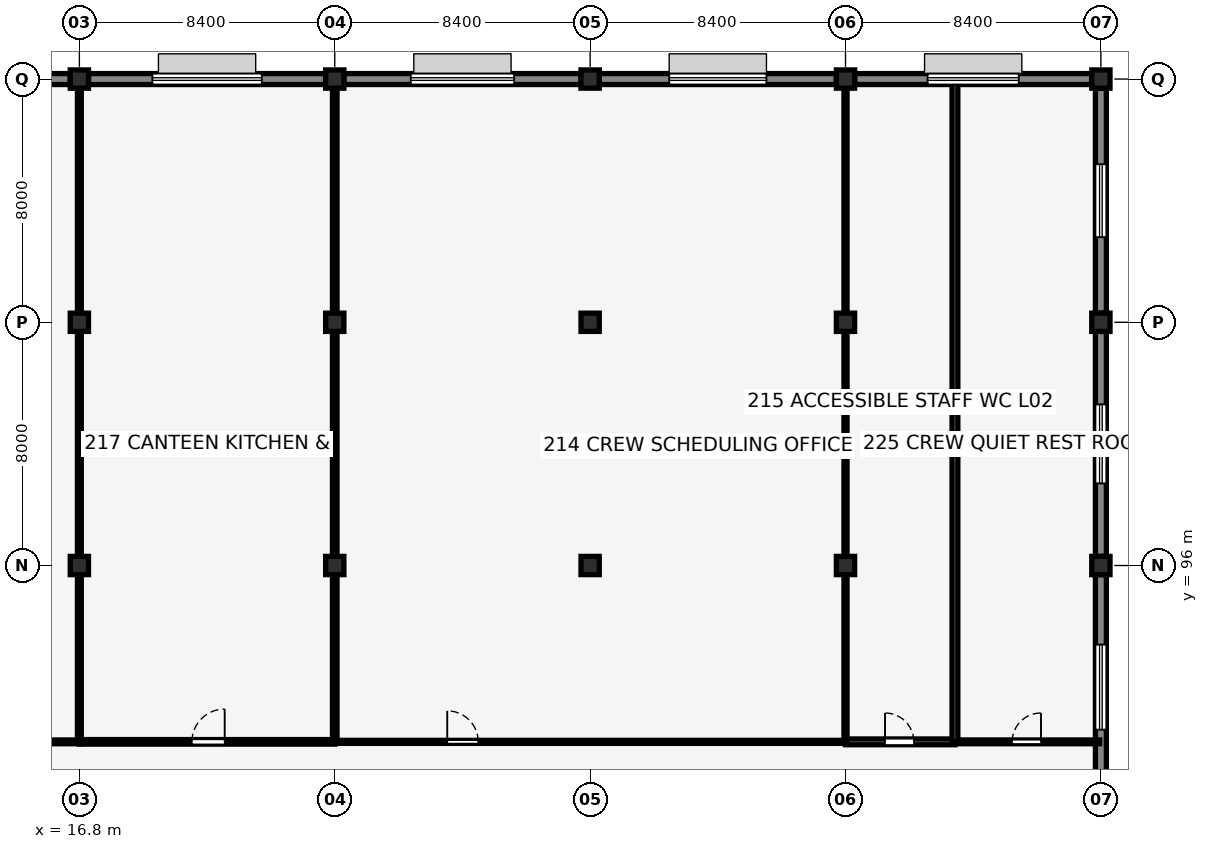
"""IFC4 building model, lengths in metres.
Left out: names, types, materials, properties, quantities, classifications, styles, units other than length and angle.
Written with IfcOpenShell. Run it as: python <this file> out.ifc"""

import sys

from ifc_helpers import new_model, si_unit, direction, frame, frame_2d, origin, origin_2d, place, context, subcontext, project, spatial, rectangle, extrude, element, fill, save


model = new_model("IFC4")
c1 = context("Model", 3, precision=1e-05, world=origin(), true_north=direction((0.0, 1.0)))
c2 = subcontext(c1, "Body", "Model", "MODEL_VIEW")
j1 = project(units=[si_unit("LENGTHUNIT", "METRE"), si_unit("PLANEANGLEUNIT", "RADIAN")], contexts=[c1])
p1 = place(None, origin())
s1 = spatial("IfcSite", under=j1, at=p1, CompositionType="ELEMENT")
p2 = place(p1, origin())
s2 = spatial("IfcBuilding", under=s1, at=p2, CompositionType="ELEMENT")
p3 = place(p2, frame((0.0, 0.0, 9.52)))
s3 = spatial("IfcBuildingStorey", under=s2, at=p3, CompositionType="ELEMENT", Elevation=9.52)
for number, where, z_axis, x_axis in (
    (1, (16.8, 96.0, 0.0), (0.0, 0.0, 1.0), (1.0, 0.0, 0.0)),
    (2, (16.8, 104.0, 0.0), (0.0, 0.0, 1.0), (1.0, 0.0, 0.0)),
    (3, (16.8, 112.0, 0.0), (0.0, 0.0, 1.0), (1.0, 0.0, 0.0)),
    (4, (25.2, 96.0, 0.0), (0.0, 0.0, 1.0), (1.0, 0.0, 0.0)),
    (5, (25.2, 104.0, 0.0), (0.0, 0.0, 1.0), (1.0, 0.0, 0.0)),
    (6, (25.2, 112.0, 0.0), (0.0, 0.0, 1.0), (1.0, 0.0, 0.0)),
    (7, (33.6, 96.0, 0.0), (0.0, 0.0, 1.0), (1.0, 0.0, 0.0)),
    (8, (33.6, 104.0, 0.0), (0.0, 0.0, 1.0), (1.0, 0.0, 0.0)),
    (9, (33.6, 112.0, 0.0), (0.0, 0.0, 1.0), (1.0, 0.0, 0.0)),
    (10, (42.0, 96.0, 0.0), (0.0, 0.0, 1.0), (1.0, 0.0, 0.0)),
    (11, (42.0, 104.0, 0.0), (0.0, 0.0, 1.0), (1.0, 0.0, 0.0)),
    (12, (42.0, 112.0, 0.0), (0.0, 0.0, 1.0), (1.0, 0.0, 0.0)),
    (13, (50.4, 96.0, 0.0), (0.0, 0.0, 1.0), (1.0, 0.0, 0.0)),
    (14, (50.4, 104.0, 0.0), (0.0, 0.0, 1.0), (1.0, 0.0, 0.0)),
    (15, (50.4, 112.0, 0.0), (0.0, 0.0, 1.0), (1.0, 0.0, 0.0)),
):
    element("IfcColumn", number, at=place(p3, frame(where, z_axis=z_axis, x_axis=x_axis)), inside=s3, PredefinedType="COLUMN", context=c2, shape_type="SweptSolid", body=[
        extrude(rectangle(XDim=0.6, YDim=0.6, at=origin_2d()), origin(), (0.0, 0.0, 1.0), 3.57),
    ])
p4 = place(p3, frame((33.9, 112.0, 0.0), z_axis=(0.0, 0.0, 1.0), x_axis=(1.0, 0.0, 0.0)))
e16 = element("IfcWall", 16, at=p4, inside=s3, PredefinedType="SOLIDWALL", context=c2, shape_type="SweptSolid", body=[
    extrude(rectangle(XDim=7.8, YDim=0.36, at=frame_2d((3.9, 0.0))), origin(), (0.0, 0.0, 1.0), 3.27),
])
p5 = place(p4, frame((2.3, 0.0, 0.9), z_axis=(0.0, 0.0, 1.0), x_axis=(1.0, 0.0, 0.0)))
e17 = element("IfcOpeningElement", 17, at=p5, cuts=e16, PredefinedType="OPENING", context=c2, shape_type="SweptSolid", body=[
    extrude(rectangle(XDim=3.2, YDim=1.65, at=frame_2d((1.6, 0.825))), frame((0.0, 0.19, 0.0), z_axis=(0.0, -1.0, 0.0), x_axis=(1.0, 0.0, 0.0)), (0.0, 0.0, 1.0), 0.38),
])
p6 = place(p3, frame((42.3, 112.0, 0.0), z_axis=(0.0, 0.0, 1.0), x_axis=(1.0, 0.0, 0.0)))
e18 = element("IfcWall", 18, at=p6, inside=s3, PredefinedType="SOLIDWALL", context=c2, shape_type="SweptSolid", body=[
    extrude(rectangle(XDim=7.8, YDim=0.36, at=frame_2d((3.9, 0.0))), origin(), (0.0, 0.0, 1.0), 3.27),
])
p7 = place(p6, frame((2.4, 0.0, 0.9), z_axis=(0.0, 0.0, 1.0), x_axis=(1.0, 0.0, 0.0)))
e19 = element("IfcOpeningElement", 19, at=p7, cuts=e18, PredefinedType="OPENING", context=c2, shape_type="SweptSolid", body=[
    extrude(rectangle(XDim=3.0, YDim=1.65, at=frame_2d((1.5, 0.825))), frame((0.0, 0.19, 0.0), z_axis=(0.0, -1.0, 0.0), x_axis=(1.0, 0.0, 0.0)), (0.0, 0.0, 1.0), 0.38),
])
p8 = place(p3, frame((50.4, 88.3, 0.0), z_axis=(0.0, 0.0, 1.0), x_axis=(0.0, 1.0, 0.0)))
e20 = element("IfcWall", 20, at=p8, inside=s3, PredefinedType="SOLIDWALL", context=c2, shape_type="SweptSolid", body=[
    extrude(rectangle(XDim=7.4, YDim=0.36, at=frame_2d((3.7, 0.0))), origin(), (0.0, 0.0, 1.0), 3.219),
])
p9 = place(p8, frame((2.3, 0.0, 0.9), z_axis=(0.0, 0.0, 1.0), x_axis=(1.0, 0.0, 0.0)))
e21 = element("IfcOpeningElement", 21, at=p9, cuts=e20, PredefinedType="OPENING", context=c2, shape_type="SweptSolid", body=[
    extrude(rectangle(XDim=2.8, YDim=1.6, at=frame_2d((1.4, 0.8))), frame((0.0, 0.19, 0.0), z_axis=(0.0, -1.0, 0.0), x_axis=(1.0, 0.0, 0.0)), (0.0, 0.0, 1.0), 0.38),
])
p10 = place(p3, frame((50.4, 96.3, 0.0), z_axis=(0.0, 0.0, 1.0), x_axis=(0.0, 1.0, 0.0)))
e22 = element("IfcWall", 22, at=p10, inside=s3, PredefinedType="SOLIDWALL", context=c2, shape_type="SweptSolid", body=[
    extrude(rectangle(XDim=7.4, YDim=0.36, at=frame_2d((3.7, 0.0))), origin(), (0.0, 0.0, 1.0), 3.219),
])
p11 = place(p10, frame((2.4, 0.0, 0.9), z_axis=(0.0, 0.0, 1.0), x_axis=(1.0, 0.0, 0.0)))
e23 = element("IfcOpeningElement", 23, at=p11, cuts=e22, PredefinedType="OPENING", context=c2, shape_type="SweptSolid", body=[
    extrude(rectangle(XDim=2.6, YDim=1.8, at=frame_2d((1.3, 0.9))), frame((0.0, 0.19, 0.0), z_axis=(0.0, -1.0, 0.0), x_axis=(1.0, 0.0, 0.0)), (0.0, 0.0, 1.0), 0.38),
])
p12 = place(p3, frame((50.4, 104.3, 0.0), z_axis=(0.0, 0.0, 1.0), x_axis=(0.0, 1.0, 0.0)))
e24 = element("IfcWall", 24, at=p12, inside=s3, PredefinedType="SOLIDWALL", context=c2, shape_type="SweptSolid", body=[
    extrude(rectangle(XDim=7.4, YDim=0.36, at=frame_2d((3.7, 0.0))), origin(), (0.0, 0.0, 1.0), 3.219),
])
p13 = place(p12, frame((2.5, 0.0, 0.9), z_axis=(0.0, 0.0, 1.0), x_axis=(1.0, 0.0, 0.0)))
e25 = element("IfcOpeningElement", 25, at=p13, cuts=e24, PredefinedType="OPENING", context=c2, shape_type="SweptSolid", body=[
    extrude(rectangle(XDim=2.4, YDim=1.75, at=frame_2d((1.2, 0.875))), frame((0.0, 0.19, 0.0), z_axis=(0.0, -1.0, 0.0), x_axis=(1.0, 0.0, 0.0)), (0.0, 0.0, 1.0), 0.38),
])
p14 = place(p3, frame((8.7, 112.0, 0.0), z_axis=(0.0, 0.0, 1.0), x_axis=(1.0, 0.0, 0.0)))
e26 = element("IfcWall", 26, at=p14, inside=s3, PredefinedType="SOLIDWALL", context=c2, shape_type="SweptSolid", body=[
    extrude(rectangle(XDim=7.8, YDim=0.36, at=frame_2d((3.9, 0.0))), origin(), (0.0, 0.0, 1.0), 3.27),
])
p15 = place(p14, frame((3.1, 0.0, 0.9), z_axis=(0.0, 0.0, 1.0), x_axis=(1.0, 0.0, 0.0)))
e27 = element("IfcOpeningElement", 27, at=p15, cuts=e26, PredefinedType="OPENING", context=c2, shape_type="SweptSolid", body=[
    extrude(rectangle(XDim=1.6, YDim=1.2, at=frame_2d((0.8, 0.6))), frame((0.0, 0.19, 0.0), z_axis=(0.0, -1.0, 0.0), x_axis=(1.0, 0.0, 0.0)), (0.0, 0.0, 1.0), 0.38),
])
p16 = place(p3, frame((17.1, 112.0, 0.0), z_axis=(0.0, 0.0, 1.0), x_axis=(1.0, 0.0, 0.0)))
e28 = element("IfcWall", 28, at=p16, inside=s3, PredefinedType="SOLIDWALL", context=c2, shape_type="SweptSolid", body=[
    extrude(rectangle(XDim=7.8, YDim=0.36, at=frame_2d((3.9, 0.0))), origin(), (0.0, 0.0, 1.0), 3.27),
])
p17 = place(p16, frame((2.1, 0.0, 0.9), z_axis=(0.0, 0.0, 1.0), x_axis=(1.0, 0.0, 0.0)))
e29 = element("IfcOpeningElement", 29, at=p17, cuts=e28, PredefinedType="OPENING", context=c2, shape_type="SweptSolid", body=[
    extrude(rectangle(XDim=3.6, YDim=1.8, at=frame_2d((1.8, 0.9))), frame((0.0, 0.19, 0.0), z_axis=(0.0, -1.0, 0.0), x_axis=(1.0, 0.0, 0.0)), (0.0, 0.0, 1.0), 0.38),
])
p18 = place(p3, frame((25.5, 112.0, 0.0), z_axis=(0.0, 0.0, 1.0), x_axis=(1.0, 0.0, 0.0)))
e30 = element("IfcWall", 30, at=p18, inside=s3, PredefinedType="SOLIDWALL", context=c2, shape_type="SweptSolid", body=[
    extrude(rectangle(XDim=7.8, YDim=0.36, at=frame_2d((3.9, 0.0))), origin(), (0.0, 0.0, 1.0), 3.27),
])
p19 = place(p18, frame((2.2, 0.0, 0.9), z_axis=(0.0, 0.0, 1.0), x_axis=(1.0, 0.0, 0.0)))
e31 = element("IfcOpeningElement", 31, at=p19, cuts=e30, PredefinedType="OPENING", context=c2, shape_type="SweptSolid", body=[
    extrude(rectangle(XDim=3.4, YDim=1.7, at=frame_2d((1.7, 0.85))), frame((0.0, 0.19, 0.0), z_axis=(0.0, -1.0, 0.0), x_axis=(1.0, 0.0, 0.0)), (0.0, 0.0, 1.0), 0.38),
])
p20 = place(p3, frame((0.04, 90.2, 0.0), z_axis=(0.0, 0.0, 1.0), x_axis=(1.0, 0.0, 0.0)))
e32 = element("IfcWall", 32, at=p20, inside=s3, PredefinedType="PARTITIONING", context=c2, shape_type="SweptSolid", body=[
    extrude(rectangle(XDim=16.76, YDim=0.125, at=frame_2d((8.38, 0.0))), origin(), (0.0, 0.0, 1.0), 3.107),
])
p21 = place(p20, frame((3.66, 0.0, 0.0), z_axis=(0.0, 0.0, 1.0), x_axis=(1.0, 0.0, 0.0)))
e33 = element("IfcOpeningElement", 33, at=p21, cuts=e32, PredefinedType="OPENING", context=c2, shape_type="SweptSolid", body=[
    extrude(rectangle(XDim=0.92, YDim=2.12, at=frame_2d((0.46, 1.06))), frame((0.0, 0.073, 0.0), z_axis=(0.0, -1.0, 0.0), x_axis=(1.0, 0.0, 0.0)), (0.0, 0.0, 1.0), 0.145),
])
p22 = place(p3, frame((16.8, 90.2, 0.0), z_axis=(0.0, 0.0, 1.0), x_axis=(1.0, 0.0, 0.0)))
e34 = element("IfcWall", 34, at=p22, inside=s3, PredefinedType="PARTITIONING", context=c2, shape_type="SweptSolid", body=[
    extrude(rectangle(XDim=8.4, YDim=0.15, at=frame_2d((4.2, 0.0))), origin(), (0.0, 0.0, 1.0), 3.57),
])
p23 = place(p22, frame((3.7, 0.0, 0.0), z_axis=(0.0, 0.0, 1.0), x_axis=(1.0, 0.0, 0.0)))
e35 = element("IfcOpeningElement", 35, at=p23, cuts=e34, PredefinedType="OPENING", context=c2, shape_type="SweptSolid", body=[
    extrude(rectangle(XDim=1.08, YDim=2.18, at=frame_2d((0.54, 1.09))), frame((0.0, 0.085, 0.0), z_axis=(0.0, -1.0, 0.0), x_axis=(1.0, 0.0, 0.0)), (0.0, 0.0, 1.0), 0.17),
])
p24 = place(p3, frame((25.2, 90.2, 0.0), z_axis=(0.0, 0.0, 1.0), x_axis=(1.0, 0.0, 0.0)))
e36 = element("IfcWall", 36, at=p24, inside=s3, PredefinedType="PARTITIONING", context=c2, shape_type="SweptSolid", body=[
    extrude(rectangle(XDim=16.8, YDim=0.1, at=frame_2d((8.4, 0.0))), origin(), (0.0, 0.0, 1.0), 3.57),
])
p25 = place(p24, frame((3.7, 0.0, 0.0), z_axis=(0.0, 0.0, 1.0), x_axis=(1.0, 0.0, 0.0)))
e37 = element("IfcOpeningElement", 37, at=p25, cuts=e36, PredefinedType="OPENING", context=c2, shape_type="SweptSolid", body=[
    extrude(rectangle(XDim=1.02, YDim=2.16, at=frame_2d((0.51, 1.08))), frame((0.0, 0.06, 0.0), z_axis=(0.0, -1.0, 0.0), x_axis=(1.0, 0.0, 0.0)), (0.0, 0.0, 1.0), 0.12),
])
p26 = place(p3, frame((42.0, 90.2, 0.0), z_axis=(0.0, 0.0, 1.0), x_axis=(1.0, 0.0, 0.0)))
e38 = element("IfcWall", 38, at=p26, inside=s3, PredefinedType="PLUMBINGWALL", context=c2, shape_type="SweptSolid", body=[
    extrude(rectangle(XDim=3.6, YDim=0.19, at=frame_2d((1.8, 0.0))), origin(), (0.0, 0.0, 1.0), 3.57),
])
p27 = place(p26, frame((1.3, 0.0, 0.0), z_axis=(0.0, 0.0, 1.0), x_axis=(1.0, 0.0, 0.0)))
e39 = element("IfcOpeningElement", 39, at=p27, cuts=e38, PredefinedType="OPENING", context=c2, shape_type="SweptSolid", body=[
    extrude(rectangle(XDim=0.95, YDim=2.15, at=frame_2d((0.475, 1.075))), frame((0.0, 0.105, 0.0), z_axis=(0.0, -1.0, 0.0), x_axis=(1.0, 0.0, 0.0)), (0.0, 0.0, 1.0), 0.21),
])
p28 = place(p3, frame((45.6, 90.2, 0.0), z_axis=(0.0, 0.0, 1.0), x_axis=(1.0, 0.0, 0.0)))
e40 = element("IfcWall", 40, at=p28, inside=s3, PredefinedType="PARTITIONING", context=c2, shape_type="SweptSolid", body=[
    extrude(rectangle(XDim=4.76, YDim=0.125, at=frame_2d((2.38, 0.0))), origin(), (0.0, 0.0, 1.0), 3.57),
])
p29 = place(p28, frame((1.88, 0.0, 0.0), z_axis=(0.0, 0.0, 1.0), x_axis=(1.0, 0.0, 0.0)))
e41 = element("IfcOpeningElement", 41, at=p29, cuts=e40, PredefinedType="OPENING", context=c2, shape_type="SweptSolid", body=[
    extrude(rectangle(XDim=0.95, YDim=2.15, at=frame_2d((0.475, 1.075))), frame((0.0, 0.073, 0.0), z_axis=(0.0, -1.0, 0.0), x_axis=(1.0, 0.0, 0.0)), (0.0, 0.0, 1.0), 0.145),
])
p30 = place(p3, frame((16.8, 90.2, 0.0), z_axis=(0.0, 0.0, 1.0), x_axis=(0.0, 1.0, 0.0)))
e42 = element("IfcWall", 42, at=p30, inside=s3, PredefinedType="PARTITIONING", context=c2, shape_type="SweptSolid", body=[
    extrude(rectangle(XDim=5.51, YDim=0.125, at=frame_2d((2.755, 0.0))), origin(), (0.0, 0.0, 1.0), 3.107),
])
for number, where, z_axis, x_axis in (
    (43, (16.8, 96.29, 0.0), (0.0, 0.0, 1.0), (0.0, 1.0, 0.0)),
    (44, (16.8, 104.29, 0.0), (0.0, 0.0, 1.0), (0.0, 1.0, 0.0)),
):
    element("IfcWall", number, at=place(p3, frame(where, z_axis=z_axis, x_axis=x_axis)), inside=s3, PredefinedType="PARTITIONING", context=c2, shape_type="SweptSolid", body=[
        extrude(rectangle(XDim=7.42, YDim=0.125, at=frame_2d((3.71, 0.0))), origin(), (0.0, 0.0, 1.0), 3.107),
    ])
p31 = place(p3, frame((25.2, 90.2, 0.0), z_axis=(0.0, 0.0, 1.0), x_axis=(0.0, 1.0, 0.0)))
e45 = element("IfcWall", 45, at=p31, inside=s3, PredefinedType="PARTITIONING", context=c2, shape_type="SweptSolid", body=[
    extrude(rectangle(XDim=5.51, YDim=0.15, at=frame_2d((2.755, 0.0))), origin(), (0.0, 0.0, 1.0), 3.107),
])
for number, where, z_axis, x_axis in (
    (46, (25.2, 96.29, 0.0), (0.0, 0.0, 1.0), (0.0, 1.0, 0.0)),
    (47, (25.2, 104.29, 0.0), (0.0, 0.0, 1.0), (0.0, 1.0, 0.0)),
):
    element("IfcWall", number, at=place(p3, frame(where, z_axis=z_axis, x_axis=x_axis)), inside=s3, PredefinedType="PARTITIONING", context=c2, shape_type="SweptSolid", body=[
        extrude(rectangle(XDim=7.42, YDim=0.15, at=frame_2d((3.71, 0.0))), origin(), (0.0, 0.0, 1.0), 3.107),
    ])
p32 = place(p3, frame((42.0, 90.2, 0.0), z_axis=(0.0, 0.0, 1.0), x_axis=(0.0, 1.0, 0.0)))
e48 = element("IfcWall", 48, at=p32, inside=s3, PredefinedType="PARTITIONING", context=c2, shape_type="SweptSolid", body=[
    extrude(rectangle(XDim=5.51, YDim=0.1, at=frame_2d((2.755, 0.0))), origin(), (0.0, 0.0, 1.0), 3.107),
])
for number, where, z_axis, x_axis in (
    (49, (42.0, 96.29, 0.0), (0.0, 0.0, 1.0), (0.0, 1.0, 0.0)),
    (50, (42.0, 104.29, 0.0), (0.0, 0.0, 1.0), (0.0, 1.0, 0.0)),
):
    element("IfcWall", number, at=place(p3, frame(where, z_axis=z_axis, x_axis=x_axis)), inside=s3, PredefinedType="PARTITIONING", context=c2, shape_type="SweptSolid", body=[
        extrude(rectangle(XDim=7.42, YDim=0.1, at=frame_2d((3.71, 0.0))), origin(), (0.0, 0.0, 1.0), 3.107),
    ])
p33 = place(p3, frame((45.6, 90.2, 0.0), z_axis=(0.0, 0.0, 1.0), x_axis=(0.0, 1.0, 0.0)))
e51 = element("IfcWall", 51, at=p33, inside=s3, PredefinedType="PLUMBINGWALL", context=c2, shape_type="SweptSolid", body=[
    extrude(rectangle(XDim=21.76, YDim=0.19, at=frame_2d((10.88, 0.0))), origin(), (0.0, 0.0, 1.0), 3.57),
])
p34 = place(p5, origin())
e52 = element("IfcWindow", 52, at=p34, inside=s3, PartitioningType="TRIPLE_PANEL_VERTICAL", PredefinedType="WINDOW", context=c2, shape_type="SweptSolid", body=[
    extrude(rectangle(XDim=3.2, YDim=1.65, at=frame_2d((1.6, 0.825))), frame((0.0, 0.03, 0.0), z_axis=(0.0, -1.0, 0.0), x_axis=(1.0, 0.0, 0.0)), (0.0, 0.0, 1.0), 0.06),
])
fill(e17, e52)
p35 = place(p7, origin())
e53 = element("IfcWindow", 53, at=p35, inside=s3, PartitioningType="DOUBLE_PANEL_VERTICAL", PredefinedType="WINDOW", context=c2, shape_type="SweptSolid", body=[
    extrude(rectangle(XDim=3.0, YDim=1.65, at=frame_2d((1.5, 0.825))), frame((0.0, 0.03, 0.0), z_axis=(0.0, -1.0, 0.0), x_axis=(1.0, 0.0, 0.0)), (0.0, 0.0, 1.0), 0.06),
])
fill(e19, e53)
p36 = place(p9, origin())
e54 = element("IfcWindow", 54, at=p36, inside=s3, PartitioningType="DOUBLE_PANEL_VERTICAL", PredefinedType="WINDOW", context=c2, shape_type="SweptSolid", body=[
    extrude(rectangle(XDim=2.8, YDim=1.6, at=frame_2d((1.4, 0.8))), frame((0.0, 0.03, 0.0), z_axis=(0.0, -1.0, 0.0), x_axis=(1.0, 0.0, 0.0)), (0.0, 0.0, 1.0), 0.06),
])
fill(e21, e54)
p37 = place(p11, origin())
e55 = element("IfcWindow", 55, at=p37, inside=s3, PartitioningType="DOUBLE_PANEL_VERTICAL", PredefinedType="WINDOW", context=c2, shape_type="SweptSolid", body=[
    extrude(rectangle(XDim=2.6, YDim=1.8, at=frame_2d((1.3, 0.9))), frame((0.0, 0.03, 0.0), z_axis=(0.0, -1.0, 0.0), x_axis=(1.0, 0.0, 0.0)), (0.0, 0.0, 1.0), 0.06),
])
fill(e23, e55)
p38 = place(p13, origin())
e56 = element("IfcWindow", 56, at=p38, inside=s3, PartitioningType="DOUBLE_PANEL_VERTICAL", PredefinedType="WINDOW", context=c2, shape_type="SweptSolid", body=[
    extrude(rectangle(XDim=2.4, YDim=1.75, at=frame_2d((1.2, 0.875))), frame((0.0, 0.03, 0.0), z_axis=(0.0, -1.0, 0.0), x_axis=(1.0, 0.0, 0.0)), (0.0, 0.0, 1.0), 0.06),
])
fill(e25, e56)
p39 = place(p17, origin())
e57 = element("IfcWindow", 57, at=p39, inside=s3, PartitioningType="TRIPLE_PANEL_VERTICAL", PredefinedType="WINDOW", context=c2, shape_type="SweptSolid", body=[
    extrude(rectangle(XDim=3.6, YDim=1.8, at=frame_2d((1.8, 0.9))), frame((0.0, 0.03, 0.0), z_axis=(0.0, -1.0, 0.0), x_axis=(1.0, 0.0, 0.0)), (0.0, 0.0, 1.0), 0.06),
])
fill(e29, e57)
p40 = place(p19, origin())
e58 = element("IfcWindow", 58, at=p40, inside=s3, PartitioningType="TRIPLE_PANEL_VERTICAL", PredefinedType="WINDOW", context=c2, shape_type="SweptSolid", body=[
    extrude(rectangle(XDim=3.4, YDim=1.7, at=frame_2d((1.7, 0.85))), frame((0.0, 0.03, 0.0), z_axis=(0.0, -1.0, 0.0), x_axis=(1.0, 0.0, 0.0)), (0.0, 0.0, 1.0), 0.06),
])
fill(e31, e58)
p41 = place(p23, origin())
e59 = element("IfcDoor", 59, at=p41, inside=s3, OperationType="SINGLE_SWING_RIGHT", PredefinedType="DOOR", context=c2, shape_type="SweptSolid", body=[
    extrude(rectangle(XDim=1.08, YDim=2.18, at=frame_2d((0.54, 1.09))), frame((0.0, 0.025, 0.0), z_axis=(0.0, -1.0, 0.0), x_axis=(1.0, 0.0, 0.0)), (0.0, 0.0, 1.0), 0.05),
])
fill(e35, e59)
p42 = place(p25, origin())
e60 = element("IfcDoor", 60, at=p42, inside=s3, OperationType="SINGLE_SWING_LEFT", PredefinedType="DOOR", context=c2, shape_type="SweptSolid", body=[
    extrude(rectangle(XDim=1.02, YDim=2.16, at=frame_2d((0.51, 1.08))), frame((0.0, 0.025, 0.0), z_axis=(0.0, -1.0, 0.0), x_axis=(1.0, 0.0, 0.0)), (0.0, 0.0, 1.0), 0.05),
])
fill(e37, e60)
p43 = place(p27, origin())
e61 = element("IfcDoor", 61, at=p43, inside=s3, OperationType="SINGLE_SWING_LEFT", PredefinedType="DOOR", context=c2, shape_type="SweptSolid", body=[
    extrude(rectangle(XDim=0.95, YDim=2.15, at=frame_2d((0.475, 1.075))), frame((0.0, 0.025, 0.0), z_axis=(0.0, -1.0, 0.0), x_axis=(1.0, 0.0, 0.0)), (0.0, 0.0, 1.0), 0.05),
])
fill(e39, e61)
p44 = place(p29, origin())
e62 = element("IfcDoor", 62, at=p44, inside=s3, OperationType="SINGLE_SWING_RIGHT", PredefinedType="DOOR", context=c2, shape_type="SweptSolid", body=[
    extrude(rectangle(XDim=0.95, YDim=2.15, at=frame_2d((0.475, 1.075))), frame((0.0, 0.025, 0.0), z_axis=(0.0, -1.0, 0.0), x_axis=(1.0, 0.0, 0.0)), (0.0, 0.0, 1.0), 0.05),
])
fill(e41, e62)
save(model, sys.argv[1])
